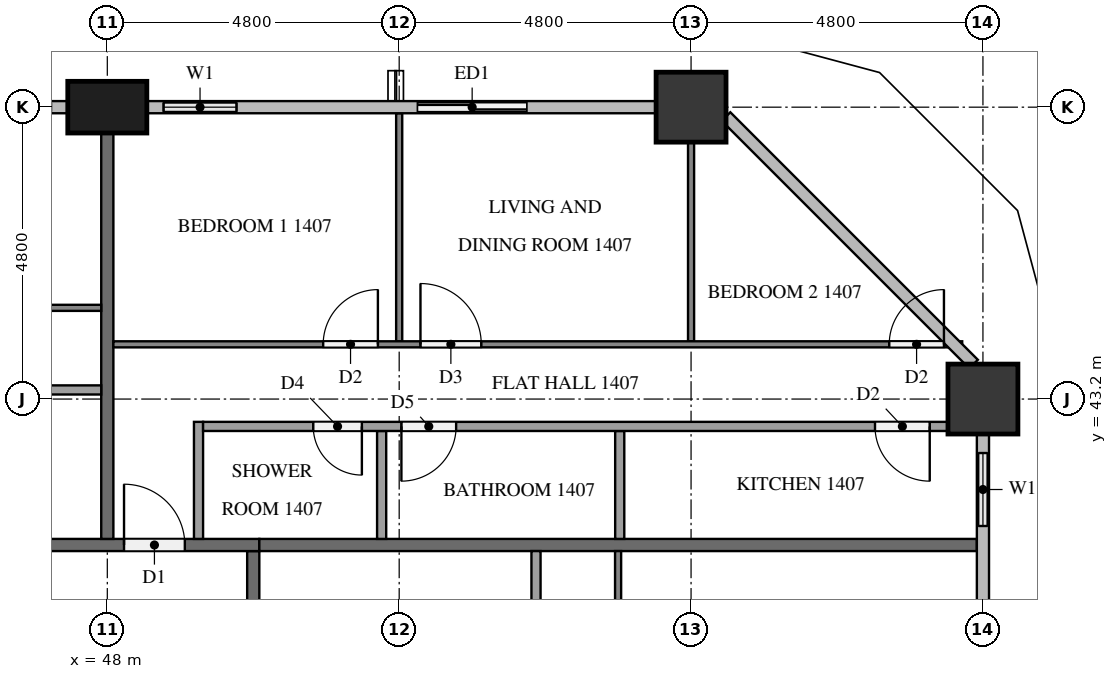
"""IFC4 building model, lengths in metres.
Left out: names, types, materials, properties, quantities, classifications, styles, units other than length and angle.
Written with IfcOpenShell. Run it as: python <this file> out.ifc"""

import sys

from ifc_helpers import new_model, si_unit, direction, frame, frame_2d, origin, origin_2d, place, context, subcontext, project, spatial, rectangle, extrude, element, fill, save


model = new_model("IFC4")
c1 = context("Model", 3, precision=1e-05, world=origin(), true_north=direction((0.0, 1.0)))
c2 = subcontext(c1, "Body", "Model", "MODEL_VIEW")
j1 = project(units=[si_unit("LENGTHUNIT", "METRE"), si_unit("PLANEANGLEUNIT", "RADIAN")], contexts=[c1])
p1 = place(None, origin())
s1 = spatial("IfcSite", under=j1, at=p1, CompositionType="ELEMENT")
p2 = place(p1, origin())
s2 = spatial("IfcBuilding", under=s1, at=p2, CompositionType="ELEMENT")
p3 = place(p2, frame((0.0, 0.0, 59.3)))
s3 = spatial("IfcBuildingStorey", under=s2, at=p3, CompositionType="ELEMENT", Elevation=59.3)
for number, where, z_axis, x_axis in (
    (1, (62.4, 43.2, 0.0), (0.0, 0.0, 1.0), (1.0, 0.0, 0.0)),
    (2, (57.6, 48.0, 0.0), (0.0, 0.0, 1.0), (1.0, 0.0, 0.0)),
):
    element("IfcColumn", number, at=place(p3, frame(where, z_axis=z_axis, x_axis=x_axis)), inside=s3, PredefinedType="COLUMN", context=c2, shape_type="SweptSolid", body=[
        extrude(rectangle(XDim=1.15, YDim=1.15, at=origin_2d()), origin(), (0.0, 0.0, 1.0), 3.2),
    ])
p4 = place(p3, frame((48.0, 48.0, 0.0), z_axis=(0.0, 0.0, 1.0), x_axis=(1.0, 0.0, 0.0)))
e3 = element("IfcColumn", 3, at=p4, inside=s3, PredefinedType="COLUMN", context=c2, shape_type="SweptSolid", body=[
    extrude(rectangle(XDim=1.3, YDim=0.85, at=origin_2d()), origin(), (0.0, 0.0, 1.0), 3.2),
])
p5 = place(p3, frame((62.4, 40.8, 0.0), z_axis=(0.0, 0.0, 1.0), x_axis=(0.0, 1.0, 0.0)))
e4 = element("IfcWall", 4, at=p5, inside=s3, PredefinedType="SOLIDWALL", context=c2, shape_type="SweptSolid", body=[
    extrude(rectangle(XDim=1.825, YDim=0.15, at=frame_2d((0.913, 0.0))), origin(), (0.0, 0.0, 1.0), 3.2),
])
p6 = place(p5, frame((0.312, 0.0, 0.9)))
e5 = element("IfcOpeningElement", 5, at=p6, cuts=e4, PredefinedType="OPENING", context=c2, shape_type="SweptSolid", body=[
    extrude(rectangle(XDim=1.2, YDim=1.4, at=frame_2d((0.6, 0.7))), frame((0.0, 0.085, 0.0), z_axis=(0.0, -1.0, 0.0), x_axis=(1.0, 0.0, 0.0)), (0.0, 0.0, 1.0), 0.17),
])
p7 = place(p3, frame((55.2, 48.0, 0.0), z_axis=(0.0, 0.0, 1.0), x_axis=(-1.0, 0.0, 0.0)))
e6 = element("IfcWall", 6, at=p7, inside=s3, PredefinedType="SOLIDWALL", context=c2, shape_type="SweptSolid", body=[
    extrude(rectangle(XDim=2.4, YDim=0.15, at=frame_2d((1.2, 0.0))), origin(), (0.0, 0.0, 1.0), 3.2),
])
p8 = place(p7, frame((0.3, 0.0, 0.0)))
e7 = element("IfcOpeningElement", 7, at=p8, cuts=e6, PredefinedType="OPENING", context=c2, shape_type="SweptSolid", body=[
    extrude(rectangle(XDim=1.8, YDim=2.4, at=frame_2d((0.9, 1.2))), frame((0.0, 0.085, 0.0), z_axis=(0.0, -1.0, 0.0), x_axis=(1.0, 0.0, 0.0)), (0.0, 0.0, 1.0), 0.17),
])
p9 = place(p3, frame((50.4, 48.0, 0.0), z_axis=(0.0, 0.0, 1.0), x_axis=(-1.0, 0.0, 0.0)))
e8 = element("IfcWall", 8, at=p9, inside=s3, PredefinedType="SOLIDWALL", context=c2, shape_type="SweptSolid", body=[
    extrude(rectangle(XDim=1.75, YDim=0.15, at=frame_2d((0.875, 0.0))), origin(), (0.0, 0.0, 1.0), 3.2),
])
p10 = place(p9, frame((0.275, 0.0, 0.9)))
e9 = element("IfcOpeningElement", 9, at=p10, cuts=e8, PredefinedType="OPENING", context=c2, shape_type="SweptSolid", body=[
    extrude(rectangle(XDim=1.2, YDim=1.4, at=frame_2d((0.6, 0.7))), frame((0.0, 0.085, 0.0), z_axis=(0.0, -1.0, 0.0), x_axis=(1.0, 0.0, 0.0)), (0.0, 0.0, 1.0), 0.17),
])
p11 = place(p3, frame((47.35, 48.0, 0.0), z_axis=(0.0, 0.0, 1.0), x_axis=(-1.0, 0.0, 0.0)))
e10 = element("IfcWall", 10, at=p11, inside=s3, PredefinedType="SOLIDWALL", context=c2, shape_type="SweptSolid", body=[
    extrude(rectangle(XDim=1.75, YDim=0.15, at=frame_2d((0.875, 0.0))), origin(), (0.0, 0.0, 1.0), 3.2),
])
p12 = place(p11, frame((0.275, 0.0, 0.9)))
e11 = element("IfcOpeningElement", 11, at=p12, cuts=e10, PredefinedType="OPENING", context=c2, shape_type="SweptSolid", body=[
    extrude(rectangle(XDim=1.2, YDim=1.4, at=frame_2d((0.6, 0.7))), frame((0.0, 0.085, 0.0), z_axis=(0.0, -1.0, 0.0), x_axis=(1.0, 0.0, 0.0)), (0.0, 0.0, 1.0), 0.17),
])
p13 = place(p3, frame((50.4, 40.7, 0.0), z_axis=(0.0, 0.0, 1.0), x_axis=(0.0, -1.0, 0.0)))
e12 = element("IfcWall", 12, at=p13, inside=s3, PredefinedType="PARTITIONING", context=c2, shape_type="SweptSolid", body=[
    extrude(rectangle(XDim=28.6, YDim=0.2, at=frame_2d((14.3, 0.0))), origin(), (0.0, 0.0, 1.0), 3.2),
])
p14 = place(p13, frame((24.175, 0.0, 0.0)))
e13 = element("IfcOpeningElement", 13, at=p14, cuts=e12, PredefinedType="OPENING", context=c2, shape_type="SweptSolid", body=[
    extrude(rectangle(XDim=1.0, YDim=2.1, at=frame_2d((0.5, 1.05))), frame((0.0, 0.11, 0.0), z_axis=(0.0, -1.0, 0.0), x_axis=(1.0, 0.0, 0.0)), (0.0, 0.0, 1.0), 0.22),
])
p15 = place(p13, frame((22.625, 0.0, 0.0)))
e14 = element("IfcOpeningElement", 14, at=p15, cuts=e12, PredefinedType="OPENING", context=c2, shape_type="SweptSolid", body=[
    extrude(rectangle(XDim=1.0, YDim=2.1, at=frame_2d((0.5, 1.05))), frame((0.0, 0.11, 0.0), z_axis=(0.0, -1.0, 0.0), x_axis=(1.0, 0.0, 0.0)), (0.0, 0.0, 1.0), 0.22),
])
p16 = place(p13, frame((10.625, 0.0, 0.0)))
e15 = element("IfcOpeningElement", 15, at=p16, cuts=e12, PredefinedType="OPENING", context=c2, shape_type="SweptSolid", body=[
    extrude(rectangle(XDim=1.0, YDim=2.1, at=frame_2d((0.5, 1.05))), frame((0.0, 0.11, 0.0), z_axis=(0.0, -1.0, 0.0), x_axis=(1.0, 0.0, 0.0)), (0.0, 0.0, 1.0), 0.22),
])
p17 = place(p3, frame((11.9, 40.8, 0.0), z_axis=(0.0, 0.0, 1.0), x_axis=(1.0, 0.0, 0.0)))
e16 = element("IfcWall", 16, at=p17, inside=s3, PredefinedType="PARTITIONING", context=c2, shape_type="SweptSolid", body=[
    extrude(rectangle(XDim=38.6, YDim=0.2, at=frame_2d((19.3, 0.0))), origin(), (0.0, 0.0, 1.0), 3.2),
])
p18 = place(p17, frame((36.375, 0.0, 0.0)))
e17 = element("IfcOpeningElement", 17, at=p18, cuts=e16, PredefinedType="OPENING", context=c2, shape_type="SweptSolid", body=[
    extrude(rectangle(XDim=1.0, YDim=2.1, at=frame_2d((0.5, 1.05))), frame((0.0, 0.11, 0.0), z_axis=(0.0, -1.0, 0.0), x_axis=(1.0, 0.0, 0.0)), (0.0, 0.0, 1.0), 0.22),
])
p19 = place(p17, frame((17.125, 0.0, 0.0)))
e18 = element("IfcOpeningElement", 18, at=p19, cuts=e16, PredefinedType="OPENING", context=c2, shape_type="SweptSolid", body=[
    extrude(rectangle(XDim=1.1, YDim=2.1, at=frame_2d((0.55, 1.05))), frame((0.0, 0.11, 0.0), z_axis=(0.0, -1.0, 0.0), x_axis=(1.0, 0.0, 0.0)), (0.0, 0.0, 1.0), 0.22),
])
p20 = place(p17, frame((15.625, 0.0, 0.0)))
e19 = element("IfcOpeningElement", 19, at=p20, cuts=e16, PredefinedType="OPENING", context=c2, shape_type="SweptSolid", body=[
    extrude(rectangle(XDim=1.0, YDim=2.1, at=frame_2d((0.5, 1.05))), frame((0.0, 0.11, 0.0), z_axis=(0.0, -1.0, 0.0), x_axis=(1.0, 0.0, 0.0)), (0.0, 0.0, 1.0), 0.22),
])
p21 = place(p17, frame((1.225, 0.0, 0.0)))
e20 = element("IfcOpeningElement", 20, at=p21, cuts=e16, PredefinedType="OPENING", context=c2, shape_type="SweptSolid", body=[
    extrude(rectangle(XDim=1.0, YDim=2.1, at=frame_2d((0.5, 1.05))), frame((0.0, 0.11, 0.0), z_axis=(0.0, -1.0, 0.0), x_axis=(1.0, 0.0, 0.0)), (0.0, 0.0, 1.0), 0.22),
])
p22 = place(p3, frame((50.5, 40.8, 0.0), z_axis=(0.0, 0.0, 1.0), x_axis=(1.0, 0.0, 0.0)))
e21 = element("IfcWall", 21, at=p22, inside=s3, PredefinedType="PARTITIONING", context=c2, shape_type="SweptSolid", body=[
    extrude(rectangle(XDim=11.8, YDim=0.2, at=frame_2d((5.9, 0.0))), origin(), (0.0, 0.0, 1.0), 3.2),
])
p23 = place(p3, frame((48.0, 47.575, 0.0), z_axis=(0.0, 0.0, 1.0), x_axis=(0.0, -1.0, 0.0)))
e22 = element("IfcWall", 22, at=p23, inside=s3, PredefinedType="PARTITIONING", context=c2, shape_type="SweptSolid", body=[
    extrude(rectangle(XDim=6.675, YDim=0.2, at=frame_2d((3.337, 0.0))), origin(), (0.0, 0.0, 1.0), 3.2),
])
p24 = place(p3, frame((56.4, 40.7, 0.0), z_axis=(0.0, 0.0, 1.0), x_axis=(0.0, -1.0, 0.0)))
e23 = element("IfcWall", 23, at=p24, inside=s3, PredefinedType="PARTITIONING", context=c2, shape_type="SweptSolid", body=[
    extrude(rectangle(XDim=11.8, YDim=0.1, at=frame_2d((5.9, 0.0))), origin(), (0.0, 0.0, 1.0), 3.2),
])
p25 = place(p24, frame((5.05, 0.0, 0.0)))
e24 = element("IfcOpeningElement", 24, at=p25, cuts=e23, PredefinedType="OPENING", context=c2, shape_type="SweptSolid", body=[
    extrude(rectangle(XDim=1.0, YDim=2.1, at=frame_2d((0.5, 1.05))), frame((0.0, 0.06, 0.0), z_axis=(0.0, -1.0, 0.0), x_axis=(1.0, 0.0, 0.0)), (0.0, 0.0, 1.0), 0.12),
])
p26 = place(p24, frame((3.45, 0.0, 0.0)))
e25 = element("IfcOpeningElement", 25, at=p26, cuts=e23, PredefinedType="OPENING", context=c2, shape_type="SweptSolid", body=[
    extrude(rectangle(XDim=0.9, YDim=2.1, at=frame_2d((0.45, 1.05))), frame((0.0, 0.06, 0.0), z_axis=(0.0, -1.0, 0.0), x_axis=(1.0, 0.0, 0.0)), (0.0, 0.0, 1.0), 0.12),
])
p27 = place(p3, frame((55.05, 30.375, 0.0), z_axis=(0.0, 0.0, 1.0), x_axis=(0.0, 1.0, 0.0)))
e26 = element("IfcWall", 26, at=p27, inside=s3, PredefinedType="PARTITIONING", context=c2, shape_type="SweptSolid", body=[
    extrude(rectangle(XDim=10.325, YDim=0.15, at=frame_2d((5.163, 0.0))), origin(), (0.0, 0.0, 1.0), 3.2),
])
p28 = place(p27, frame((3.005, 0.0, 0.0)))
e27 = element("IfcOpeningElement", 27, at=p28, cuts=e26, PredefinedType="OPENING", context=c2, shape_type="SweptSolid", body=[
    extrude(rectangle(XDim=0.8, YDim=2.1, at=frame_2d((0.4, 1.05))), frame((0.0, 0.085, 0.0), z_axis=(0.0, -1.0, 0.0), x_axis=(1.0, 0.0, 0.0)), (0.0, 0.0, 1.0), 0.17),
])
p29 = place(p27, frame((4.455, 0.0, 0.0)))
e28 = element("IfcOpeningElement", 28, at=p29, cuts=e26, PredefinedType="OPENING", context=c2, shape_type="SweptSolid", body=[
    extrude(rectangle(XDim=0.9, YDim=2.1, at=frame_2d((0.45, 1.05))), frame((0.0, 0.085, 0.0), z_axis=(0.0, -1.0, 0.0), x_axis=(1.0, 0.0, 0.0)), (0.0, 0.0, 1.0), 0.17),
])
p30 = place(p3, frame((52.8, 44.15, 0.0), z_axis=(0.0, 0.0, 1.0), x_axis=(0.0, 1.0, 0.0)))
e29 = element("IfcWall", 29, at=p30, inside=s3, PredefinedType="PARTITIONING", context=c2, shape_type="SweptSolid", body=[
    extrude(rectangle(XDim=3.75, YDim=0.1, at=frame_2d((1.875, 0.0))), origin(), (0.0, 0.0, 1.0), 3.2),
])
p31 = place(p3, frame((57.6, 44.15, 0.0), z_axis=(0.0, 0.0, 1.0), x_axis=(0.0, 1.0, 0.0)))
e30 = element("IfcWall", 30, at=p31, inside=s3, PredefinedType="PARTITIONING", context=c2, shape_type="SweptSolid", body=[
    extrude(rectangle(XDim=3.275, YDim=0.1, at=frame_2d((1.638, 0.0))), origin(), (0.0, 0.0, 1.0), 3.2),
])
p32 = place(p3, frame((48.1, 44.1, 0.0), z_axis=(0.0, 0.0, 1.0), x_axis=(1.0, 0.0, 0.0)))
e31 = element("IfcWall", 31, at=p32, inside=s3, PredefinedType="PARTITIONING", context=c2, shape_type="SweptSolid", body=[
    extrude(rectangle(XDim=13.959, YDim=0.1, at=frame_2d((6.979, 0.0))), origin(), (0.0, 0.0, 1.0), 3.2),
])
p33 = place(p32, frame((3.45, 0.0, 0.0)))
e32 = element("IfcOpeningElement", 32, at=p33, cuts=e31, PredefinedType="OPENING", context=c2, shape_type="SweptSolid", body=[
    extrude(rectangle(XDim=0.9, YDim=2.1, at=frame_2d((0.45, 1.05))), frame((0.0, 0.06, 0.0), z_axis=(0.0, -1.0, 0.0), x_axis=(1.0, 0.0, 0.0)), (0.0, 0.0, 1.0), 0.12),
])
p34 = place(p32, frame((5.05, 0.0, 0.0)))
e33 = element("IfcOpeningElement", 33, at=p34, cuts=e31, PredefinedType="OPENING", context=c2, shape_type="SweptSolid", body=[
    extrude(rectangle(XDim=1.0, YDim=2.1, at=frame_2d((0.5, 1.05))), frame((0.0, 0.06, 0.0), z_axis=(0.0, -1.0, 0.0), x_axis=(1.0, 0.0, 0.0)), (0.0, 0.0, 1.0), 0.12),
])
p35 = place(p32, frame((12.759, 0.0, 0.0)))
e34 = element("IfcOpeningElement", 34, at=p35, cuts=e31, PredefinedType="OPENING", context=c2, shape_type="SweptSolid", body=[
    extrude(rectangle(XDim=0.9, YDim=2.1, at=frame_2d((0.45, 1.05))), frame((0.0, 0.06, 0.0), z_axis=(0.0, -1.0, 0.0), x_axis=(1.0, 0.0, 0.0)), (0.0, 0.0, 1.0), 0.12),
])
for number, where, z_axis, x_axis in (
    (35, (52.511, 40.9, 0.0), (0.0, 0.0, 1.0), (0.0, 1.0, 0.0)),
    (36, (56.427, 40.9, 0.0), (0.0, 0.0, 1.0), (0.0, 1.0, 0.0)),
):
    element("IfcWall", number, at=place(p3, frame(where, z_axis=z_axis, x_axis=x_axis)), inside=s3, PredefinedType="PARTITIONING", context=c2, shape_type="SweptSolid", body=[
        extrude(rectangle(XDim=1.775, YDim=0.15, at=frame_2d((0.888, 0.0))), origin(), (0.0, 0.0, 1.0), 3.2),
    ])
p36 = place(p3, frame((49.5, 40.9, 0.0), z_axis=(0.0, 0.0, 1.0), x_axis=(0.0, 1.0, 0.0)))
e37 = element("IfcWall", 37, at=p36, inside=s3, PredefinedType="PARTITIONING", context=c2, shape_type="SweptSolid", body=[
    extrude(rectangle(XDim=1.925, YDim=0.15, at=frame_2d((0.962, 0.0))), origin(), (0.0, 0.0, 1.0), 3.2),
])
p37 = place(p3, frame((61.825, 42.75, 0.0), z_axis=(0.0, 0.0, 1.0), x_axis=(-1.0, 0.0, 0.0)))
e38 = element("IfcWall", 38, at=p37, inside=s3, PredefinedType="PARTITIONING", context=c2, shape_type="SweptSolid", body=[
    extrude(rectangle(XDim=12.25, YDim=0.15, at=frame_2d((6.125, 0.0))), origin(), (0.0, 0.0, 1.0), 3.2),
])
p38 = place(p37, frame((9.638, 0.0, 0.0)))
e39 = element("IfcOpeningElement", 39, at=p38, cuts=e38, PredefinedType="OPENING", context=c2, shape_type="SweptSolid", body=[
    extrude(rectangle(XDim=0.8, YDim=2.1, at=frame_2d((0.4, 1.05))), frame((0.0, 0.085, 0.0), z_axis=(0.0, -1.0, 0.0), x_axis=(1.0, 0.0, 0.0)), (0.0, 0.0, 1.0), 0.17),
])
p39 = place(p37, frame((8.088, 0.0, 0.0)))
e40 = element("IfcOpeningElement", 40, at=p39, cuts=e38, PredefinedType="OPENING", context=c2, shape_type="SweptSolid", body=[
    extrude(rectangle(XDim=0.9, YDim=2.1, at=frame_2d((0.45, 1.05))), frame((0.0, 0.085, 0.0), z_axis=(0.0, -1.0, 0.0), x_axis=(1.0, 0.0, 0.0)), (0.0, 0.0, 1.0), 0.17),
])
p40 = place(p37, frame((0.3, 0.0, 0.0)))
e41 = element("IfcOpeningElement", 41, at=p40, cuts=e38, PredefinedType="OPENING", context=c2, shape_type="SweptSolid", body=[
    extrude(rectangle(XDim=0.9, YDim=2.1, at=frame_2d((0.45, 1.05))), frame((0.0, 0.085, 0.0), z_axis=(0.0, -1.0, 0.0), x_axis=(1.0, 0.0, 0.0)), (0.0, 0.0, 1.0), 0.17),
])
p41 = place(p3, frame((28.9, 44.7, 0.0), z_axis=(0.0, 0.0, 1.0), x_axis=(1.0, 0.0, 0.0)))
e42 = element("IfcWall", 42, at=p41, inside=s3, PredefinedType="PARTITIONING", context=c2, shape_type="SweptSolid", body=[
    extrude(rectangle(XDim=19.0, YDim=0.1, at=frame_2d((9.5, 0.0))), origin(), (0.0, 0.0, 1.0), 3.2),
])
p42 = place(p41, frame((3.35, 0.0, 0.0)))
e43 = element("IfcOpeningElement", 43, at=p42, cuts=e42, PredefinedType="OPENING", context=c2, shape_type="SweptSolid", body=[
    extrude(rectangle(XDim=1.0, YDim=2.1, at=frame_2d((0.5, 1.05))), frame((0.0, 0.06, 0.0), z_axis=(0.0, -1.0, 0.0), x_axis=(1.0, 0.0, 0.0)), (0.0, 0.0, 1.0), 0.12),
])
p43 = place(p41, frame((5.05, 0.0, 0.0)))
e44 = element("IfcOpeningElement", 44, at=p43, cuts=e42, PredefinedType="OPENING", context=c2, shape_type="SweptSolid", body=[
    extrude(rectangle(XDim=0.9, YDim=2.1, at=frame_2d((0.45, 1.05))), frame((0.0, 0.06, 0.0), z_axis=(0.0, -1.0, 0.0), x_axis=(1.0, 0.0, 0.0)), (0.0, 0.0, 1.0), 0.12),
])
p44 = place(p41, frame((13.05, 0.0, 0.0)))
e45 = element("IfcOpeningElement", 45, at=p44, cuts=e42, PredefinedType="OPENING", context=c2, shape_type="SweptSolid", body=[
    extrude(rectangle(XDim=0.9, YDim=2.1, at=frame_2d((0.45, 1.05))), frame((0.0, 0.06, 0.0), z_axis=(0.0, -1.0, 0.0), x_axis=(1.0, 0.0, 0.0)), (0.0, 0.0, 1.0), 0.12),
])
p45 = place(p41, frame((14.65, 0.0, 0.0)))
e46 = element("IfcOpeningElement", 46, at=p45, cuts=e42, PredefinedType="OPENING", context=c2, shape_type="SweptSolid", body=[
    extrude(rectangle(XDim=0.9, YDim=2.1, at=frame_2d((0.45, 1.05))), frame((0.0, 0.06, 0.0), z_axis=(0.0, -1.0, 0.0), x_axis=(1.0, 0.0, 0.0)), (0.0, 0.0, 1.0), 0.12),
])
p46 = place(p3, frame((47.9, 43.35, 0.0), z_axis=(0.0, 0.0, 1.0), x_axis=(-1.0, 0.0, 0.0)))
e47 = element("IfcWall", 47, at=p46, inside=s3, PredefinedType="PARTITIONING", context=c2, shape_type="SweptSolid", body=[
    extrude(rectangle(XDim=17.525, YDim=0.15, at=frame_2d((8.762, 0.0))), origin(), (0.0, 0.0, 1.0), 3.2),
])
p47 = place(p46, frame((14.564, 0.0, 0.0)))
e48 = element("IfcOpeningElement", 48, at=p47, cuts=e47, PredefinedType="OPENING", context=c2, shape_type="SweptSolid", body=[
    extrude(rectangle(XDim=0.8, YDim=2.1, at=frame_2d((0.4, 1.05))), frame((0.0, 0.085, 0.0), z_axis=(0.0, -1.0, 0.0), x_axis=(1.0, 0.0, 0.0)), (0.0, 0.0, 1.0), 0.17),
])
p48 = place(p46, frame((13.114, 0.0, 0.0)))
e49 = element("IfcOpeningElement", 49, at=p48, cuts=e47, PredefinedType="OPENING", context=c2, shape_type="SweptSolid", body=[
    extrude(rectangle(XDim=0.8, YDim=2.1, at=frame_2d((0.4, 1.05))), frame((0.0, 0.085, 0.0), z_axis=(0.0, -1.0, 0.0), x_axis=(1.0, 0.0, 0.0)), (0.0, 0.0, 1.0), 0.17),
])
p49 = place(p46, frame((4.706, 0.0, 0.0)))
e50 = element("IfcOpeningElement", 50, at=p49, cuts=e47, PredefinedType="OPENING", context=c2, shape_type="SweptSolid", body=[
    extrude(rectangle(XDim=0.9, YDim=2.1, at=frame_2d((0.45, 1.05))), frame((0.0, 0.085, 0.0), z_axis=(0.0, -1.0, 0.0), x_axis=(1.0, 0.0, 0.0)), (0.0, 0.0, 1.0), 0.17),
])
p50 = place(p46, frame((3.156, 0.0, 0.0)))
e51 = element("IfcOpeningElement", 51, at=p50, cuts=e47, PredefinedType="OPENING", context=c2, shape_type="SweptSolid", body=[
    extrude(rectangle(XDim=0.9, YDim=2.1, at=frame_2d((0.45, 1.05))), frame((0.0, 0.085, 0.0), z_axis=(0.0, -1.0, 0.0), x_axis=(1.0, 0.0, 0.0)), (0.0, 0.0, 1.0), 0.17),
])
p51 = place(p6, origin())
e52 = element("IfcWindow", 52, at=p51, inside=s3, PartitioningType="SINGLE_PANEL", PredefinedType="WINDOW", context=c2, shape_type="SweptSolid", body=[
    extrude(rectangle(XDim=1.2, YDim=1.4, at=frame_2d((0.6, 0.7))), frame((0.0, 0.03, 0.0), z_axis=(0.0, -1.0, 0.0), x_axis=(1.0, 0.0, 0.0)), (0.0, 0.0, 1.0), 0.06),
])
fill(e5, e52)
p52 = place(p8, origin())
e53 = element("IfcDoor", 53, at=p52, inside=s3, OperationType="SLIDING_TO_RIGHT", PredefinedType="DOOR", context=c2, shape_type="SweptSolid", body=[
    extrude(rectangle(XDim=1.8, YDim=2.4, at=frame_2d((0.9, 1.2))), frame((0.0, 0.025, 0.0), z_axis=(0.0, -1.0, 0.0), x_axis=(1.0, 0.0, 0.0)), (0.0, 0.0, 1.0), 0.05),
])
fill(e7, e53)
p53 = place(p10, origin())
e54 = element("IfcWindow", 54, at=p53, inside=s3, PartitioningType="SINGLE_PANEL", PredefinedType="WINDOW", context=c2, shape_type="SweptSolid", body=[
    extrude(rectangle(XDim=1.2, YDim=1.4, at=frame_2d((0.6, 0.7))), frame((0.0, 0.03, 0.0), z_axis=(0.0, -1.0, 0.0), x_axis=(1.0, 0.0, 0.0)), (0.0, 0.0, 1.0), 0.06),
])
fill(e9, e54)
p54 = place(p18, origin())
e55 = element("IfcDoor", 55, at=p54, inside=s3, OperationType="SINGLE_SWING_LEFT", PredefinedType="DOOR", context=c2, shape_type="SweptSolid", body=[
    extrude(rectangle(XDim=1.0, YDim=2.1, at=frame_2d((0.5, 1.05))), frame((0.0, 0.025, 0.0), z_axis=(0.0, -1.0, 0.0), x_axis=(1.0, 0.0, 0.0)), (0.0, 0.0, 1.0), 0.05),
])
fill(e17, e55)
p55 = place(p33, origin())
e56 = element("IfcDoor", 56, at=p55, inside=s3, OperationType="SINGLE_SWING_RIGHT", PredefinedType="DOOR", context=c2, shape_type="SweptSolid", body=[
    extrude(rectangle(XDim=0.9, YDim=2.1, at=frame_2d((0.45, 1.05))), frame((0.0, 0.025, 0.0), z_axis=(0.0, -1.0, 0.0), x_axis=(1.0, 0.0, 0.0)), (0.0, 0.0, 1.0), 0.05),
])
fill(e32, e56)
p56 = place(p34, origin())
e57 = element("IfcDoor", 57, at=p56, inside=s3, OperationType="SINGLE_SWING_LEFT", PredefinedType="DOOR", context=c2, shape_type="SweptSolid", body=[
    extrude(rectangle(XDim=1.0, YDim=2.1, at=frame_2d((0.5, 1.05))), frame((0.0, 0.025, 0.0), z_axis=(0.0, -1.0, 0.0), x_axis=(1.0, 0.0, 0.0)), (0.0, 0.0, 1.0), 0.05),
])
fill(e33, e57)
p57 = place(p35, origin())
e58 = element("IfcDoor", 58, at=p57, inside=s3, OperationType="SINGLE_SWING_RIGHT", PredefinedType="DOOR", context=c2, shape_type="SweptSolid", body=[
    extrude(rectangle(XDim=0.9, YDim=2.1, at=frame_2d((0.45, 1.05))), frame((0.0, 0.025, 0.0), z_axis=(0.0, -1.0, 0.0), x_axis=(1.0, 0.0, 0.0)), (0.0, 0.0, 1.0), 0.05),
])
fill(e34, e58)
p58 = place(p38, origin())
e59 = element("IfcDoor", 59, at=p58, inside=s3, OperationType="SINGLE_SWING_LEFT", PredefinedType="DOOR", context=c2, shape_type="SweptSolid", body=[
    extrude(rectangle(XDim=0.8, YDim=2.1, at=frame_2d((0.4, 1.05))), frame((0.0, 0.025, 0.0), z_axis=(0.0, -1.0, 0.0), x_axis=(1.0, 0.0, 0.0)), (0.0, 0.0, 1.0), 0.05),
])
fill(e39, e59)
p59 = place(p39, origin())
e60 = element("IfcDoor", 60, at=p59, inside=s3, OperationType="SINGLE_SWING_RIGHT", PredefinedType="DOOR", context=c2, shape_type="SweptSolid", body=[
    extrude(rectangle(XDim=0.9, YDim=2.1, at=frame_2d((0.45, 1.05))), frame((0.0, 0.025, 0.0), z_axis=(0.0, -1.0, 0.0), x_axis=(1.0, 0.0, 0.0)), (0.0, 0.0, 1.0), 0.05),
])
fill(e40, e60)
p60 = place(p40, origin())
e61 = element("IfcDoor", 61, at=p60, inside=s3, OperationType="SINGLE_SWING_LEFT", PredefinedType="DOOR", context=c2, shape_type="SweptSolid", body=[
    extrude(rectangle(XDim=0.9, YDim=2.1, at=frame_2d((0.45, 1.05))), frame((0.0, 0.025, 0.0), z_axis=(0.0, -1.0, 0.0), x_axis=(1.0, 0.0, 0.0)), (0.0, 0.0, 1.0), 0.05),
])
fill(e41, e61)
save(model, sys.argv[1])
